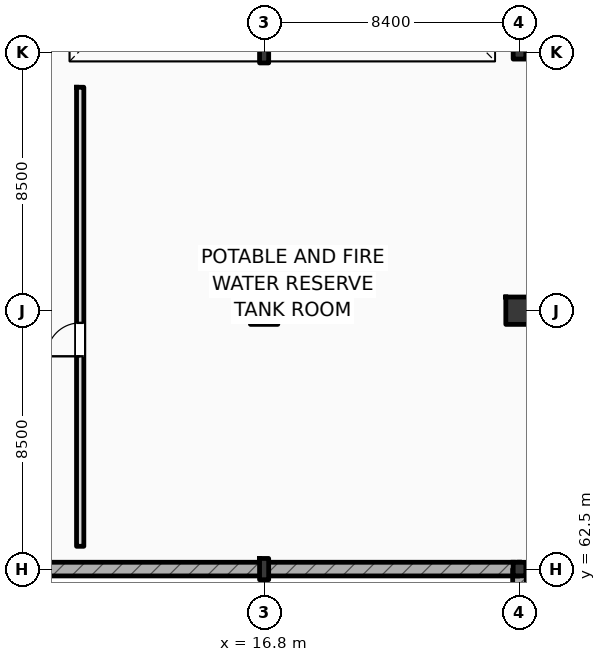
"""IFC4 building model, lengths in metres.
Left out: names, types, materials, properties, quantities, classifications, styles, units other than length and angle.
Written with IfcOpenShell. Run it as: python <this file> out.ifc"""

import sys

from ifc_helpers import new_model, si_unit, direction, frame, frame_2d, origin, origin_2d, place, context, subcontext, project, spatial, rectangle, i_section, extrude, element, fill, save


model = new_model("IFC4")
c1 = context("Model", 3, precision=1e-05, world=origin(), true_north=direction((0.0, 1.0)))
c2 = subcontext(c1, "Body", "Model", "MODEL_VIEW")
j1 = project(units=[si_unit("LENGTHUNIT", "METRE"), si_unit("PLANEANGLEUNIT", "RADIAN")], contexts=[c1])
p1 = place(None, origin())
s1 = spatial("IfcSite", under=j1, at=p1, CompositionType="ELEMENT")
p2 = place(p1, origin())
s2 = spatial("IfcBuilding", under=s1, at=p2, CompositionType="ELEMENT")
p3 = place(p2, frame((0.0, 0.0, -4.5)))
s3 = spatial("IfcBuildingStorey", under=s2, at=p3, CompositionType="ELEMENT", Elevation=-4.5)
p4 = place(p3, frame((0.0, 62.5, 0.0), z_axis=(0.0, 0.0, 1.0), x_axis=(1.0, 0.0, 0.0)))
e1 = element("IfcWall", 1, at=p4, inside=s3, PredefinedType="SOLIDWALL", context=c2, shape_type="SweptSolid", body=[
    extrude(rectangle(XDim=25.2, YDim=0.45, at=frame_2d((12.6, 0.0))), origin(), (0.0, 0.0, 1.0), 4.5),
])
p5 = place(p3, frame((25.2, 62.5, 0.0), z_axis=(0.0, 0.0, 1.0), x_axis=(0.0, -1.0, 0.0)))
e2 = element("IfcWall", 2, at=p5, inside=s3, PredefinedType="SOLIDWALL", context=c2, shape_type="SweptSolid", body=[
    extrude(rectangle(XDim=57.0, YDim=0.45, at=frame_2d((28.5, 0.0))), origin(), (0.0, 0.0, 1.0), 4.5),
])
p6 = place(p3, frame((16.8, 62.5, 0.0), z_axis=(0.0, 0.0, 1.0), x_axis=(1.0, 0.0, 0.0)))
e3 = element("IfcColumn", 3, at=p6, inside=s3, PredefinedType="COLUMN", context=c2, shape_type="SweptSolid", body=[
    extrude(i_section(OverallWidth=0.3, OverallDepth=0.7, WebThickness=0.017, FlangeThickness=0.032, FilletRadius=0.027, at=origin_2d()), origin(), (0.0, 0.0, 1.0), 4.5),
])
p7 = place(p3, frame((16.8, 71.0, 0.0), z_axis=(0.0, 0.0, 1.0), x_axis=(1.0, 0.0, 0.0)))
e4 = element("IfcColumn", 4, at=p7, inside=s3, PredefinedType="COLUMN", context=c2, shape_type="SweptSolid", body=[
    extrude(rectangle(XDim=0.9, YDim=0.9, at=origin_2d()), origin(), (0.0, 0.0, 1.0), 4.5),
])
p8 = place(p3, frame((16.8, 79.5, 0.0), z_axis=(0.0, 0.0, 1.0), x_axis=(1.0, 0.0, 0.0)))
e5 = element("IfcColumn", 5, at=p8, inside=s3, PredefinedType="COLUMN", context=c2, shape_type="SweptSolid", body=[
    extrude(i_section(OverallWidth=0.3, OverallDepth=0.7, WebThickness=0.017, FlangeThickness=0.032, FilletRadius=0.027, at=origin_2d()), origin(), (0.0, 0.0, 1.0), 4.5),
])
p9 = place(p3, frame((25.2, 62.5, 0.0), z_axis=(0.0, 0.0, 1.0), x_axis=(1.0, 0.0, 0.0)))
e6 = element("IfcColumn", 6, at=p9, inside=s3, PredefinedType="COLUMN", context=c2, shape_type="SweptSolid", body=[
    extrude(i_section(OverallWidth=0.416, OverallDepth=0.446, WebThickness=0.036, FlangeThickness=0.048, FilletRadius=0.015, at=origin_2d()), origin(), (0.0, 0.0, 1.0), 4.5),
])
p10 = place(p3, frame((25.2, 71.0, 0.0), z_axis=(0.0, 0.0, 1.0), x_axis=(1.0, 0.0, 0.0)))
e7 = element("IfcColumn", 7, at=p10, inside=s3, PredefinedType="COLUMN", context=c2, shape_type="SweptSolid", body=[
    extrude(rectangle(XDim=0.9, YDim=0.9, at=origin_2d()), origin(), (0.0, 0.0, 1.0), 4.5),
])
p11 = place(p3, frame((25.2, 79.5, 0.0), z_axis=(0.0, 0.0, 1.0), x_axis=(1.0, 0.0, 0.0)))
e8 = element("IfcColumn", 8, at=p11, inside=s3, PredefinedType="COLUMN", context=c2, shape_type="SweptSolid", body=[
    extrude(i_section(OverallWidth=0.416, OverallDepth=0.446, WebThickness=0.036, FlangeThickness=0.048, FilletRadius=0.015, at=origin_2d()), origin(), (0.0, 0.0, 1.0), 4.5),
])
p12 = place(p3, frame((10.75, 63.25, 0.0), z_axis=(0.0, 0.0, 1.0), x_axis=(0.0, 1.0, 0.0)))
e9 = element("IfcWall", 9, at=p12, inside=s3, PredefinedType="STANDARD", context=c2, shape_type="SweptSolid", body=[
    extrude(rectangle(XDim=15.1, YDim=0.24, at=frame_2d((7.55, 0.0))), origin(), (0.0, 0.0, 1.0), 4.1),
])
p13 = place(p12, frame((6.25, 0.0, 0.0)))
e10 = element("IfcOpeningElement", 10, at=p13, cuts=e9, PredefinedType="OPENING", context=c2, shape_type="SweptSolid", body=[
    extrude(rectangle(XDim=1.1, YDim=2.2, at=frame_2d((0.55, 1.1))), frame((0.0, 0.13, 0.0), z_axis=(0.0, -1.0, 0.0), x_axis=(1.0, 0.0, 0.0)), (0.0, 0.0, 1.0), 0.26),
])
p14 = place(p13, origin())
e11 = element("IfcDoor", 11, at=p14, inside=s3, OperationType="SINGLE_SWING_LEFT", PredefinedType="DOOR", context=c2, shape_type="SweptSolid", body=[
    extrude(rectangle(XDim=1.1, YDim=2.2, at=frame_2d((0.55, 1.1))), frame((0.0, 0.025, 0.0), z_axis=(0.0, -1.0, 0.0), x_axis=(1.0, 0.0, 0.0)), (0.0, 0.0, 1.0), 0.05),
])
fill(e10, e11)
save(model, sys.argv[1])
